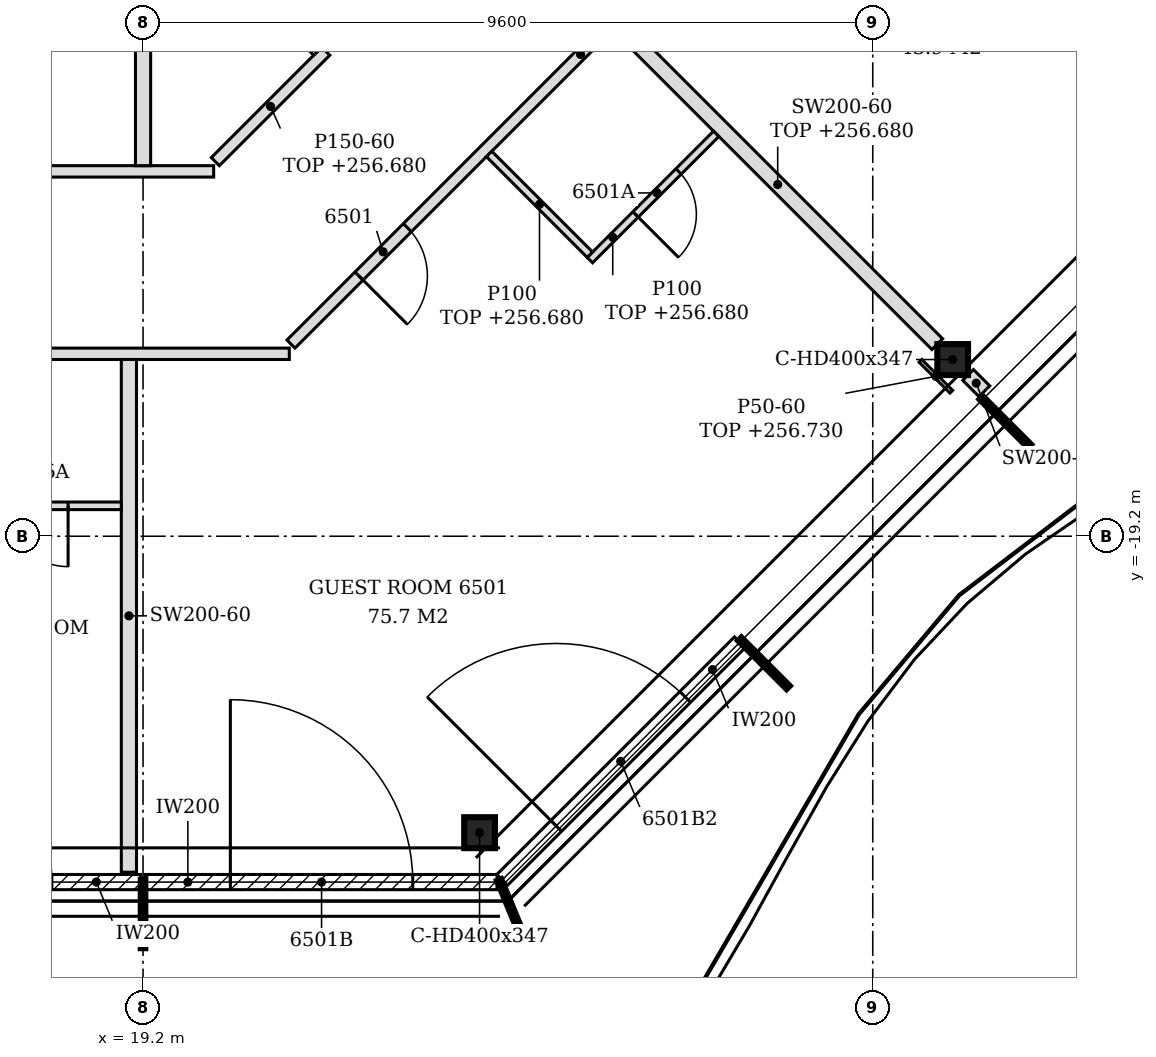
"""IFC4 building model, lengths in metres.
Left out: names, types, materials, properties, quantities, classifications, styles, units other than length and angle.
Written with IfcOpenShell. Run it as: python <this file> out.ifc"""

import sys

from ifc_helpers import new_model, si_unit, direction, frame, frame_2d, origin, origin_2d, place, context, subcontext, project, spatial, polyline, rectangle, i_section, outline, extrude, element, fill, save


model = new_model("IFC4")
c1 = context("Model", 3, precision=1e-05, world=origin(), true_north=direction((0.0, 1.0)))
c2 = subcontext(c1, "Body", "Model", "MODEL_VIEW")
j1 = project(units=[si_unit("LENGTHUNIT", "METRE"), si_unit("PLANEANGLEUNIT", "RADIAN")], contexts=[c1])
p1 = place(None, origin())
s1 = spatial("IfcSite", under=j1, at=p1, CompositionType="ELEMENT")
p2 = place(p1, origin())
s2 = spatial("IfcBuilding", under=s1, at=p2, CompositionType="ELEMENT")
p3 = place(p2, frame((0.0, 0.0, 253.8)))
s3 = spatial("IfcBuildingStorey", under=s2, at=p3, CompositionType="ELEMENT", Elevation=253.8)
for number, where, z_axis, x_axis in (
    (1, (23.627, -23.1, -0.15), (0.0, 0.0, 1.0), (1.0, 0.0, 0.0)),
    (2, (29.852, -16.876, -0.15), (0.0, 0.0, 1.0), (1.0, 0.0, 0.0)),
):
    element("IfcColumn", number, at=place(p3, frame(where, z_axis=z_axis, x_axis=x_axis)), inside=s3, PredefinedType="COLUMN", context=c2, shape_type="SweptSolid", body=[
        extrude(i_section(OverallWidth=0.404, OverallDepth=0.407, WebThickness=0.027, FlangeThickness=0.044, FilletRadius=0.015, at=origin_2d()), origin(), (0.0, 0.0, 1.0), 3.6),
    ])
p4 = place(p3, frame((14.43, -23.75, 0.0), z_axis=(0.0, 0.0, 1.0), x_axis=(1.0, 0.0, 0.0)))
e3 = element("IfcWall", 3, at=p4, inside=s3, PredefinedType="NOTDEFINED", context=c2, shape_type="SweptSolid", body=[
    extrude(rectangle(XDim=4.74, YDim=0.2, at=frame_2d((2.37, 0.0))), origin(), (0.0, 0.0, 1.0), 3.45),
])
p5 = place(p4, frame((1.17, 0.0, 0.0)))
e4 = element("IfcOpeningElement", 4, at=p5, cuts=e3, PredefinedType="OPENING", context=c2, shape_type="SweptSolid", body=[
    extrude(rectangle(XDim=2.4, YDim=2.4, at=frame_2d((1.2, 1.2))), frame((0.0, 0.11, 0.0), z_axis=(0.0, -1.0, 0.0), x_axis=(1.0, 0.0, 0.0)), (0.0, 0.0, 1.0), 0.22),
])
p6 = place(p3, frame((19.23, -23.75, 0.0), z_axis=(0.0, 0.0, 1.0), x_axis=(1.0, 0.0, 0.0)))
e5 = element("IfcWall", 5, at=p6, inside=s3, PredefinedType="NOTDEFINED", context=c2, shape_type="SweptSolid", body=[
    extrude(rectangle(XDim=4.626, YDim=0.2, at=frame_2d((2.313, 0.0))), origin(), (0.0, 0.0, 1.0), 3.45),
])
p7 = place(p6, frame((1.119, 0.0, 0.0)))
e6 = element("IfcOpeningElement", 6, at=p7, cuts=e5, PredefinedType="OPENING", context=c2, shape_type="SweptSolid", body=[
    extrude(rectangle(XDim=2.4, YDim=2.4, at=frame_2d((1.2, 1.2))), frame((0.0, 0.11, 0.0), z_axis=(0.0, -1.0, 0.0), x_axis=(1.0, 0.0, 0.0)), (0.0, 0.0, 1.0), 0.22),
])
p8 = place(p3, frame((23.925, -23.722, 0.0), z_axis=(0.0, 0.0, 1.0), x_axis=(0.707106781187, 0.707106781187, 0.0)))
e7 = element("IfcWall", 7, at=p8, inside=s3, PredefinedType="NOTDEFINED", context=c2, shape_type="SweptSolid", body=[
    extrude(rectangle(XDim=4.421, YDim=0.2, at=frame_2d((2.21, 0.0))), origin(), (0.0, 0.0, 1.0), 3.45),
])
p9 = place(p8, frame((1.005, 0.0, 0.0)))
e8 = element("IfcOpeningElement", 8, at=p9, cuts=e7, PredefinedType="OPENING", context=c2, shape_type="SweptSolid", body=[
    extrude(rectangle(XDim=2.4, YDim=2.4, at=frame_2d((1.2, 1.2))), frame((0.0, 0.11, 0.0), z_axis=(0.0, -1.0, 0.0), x_axis=(1.0, 0.0, 0.0)), (0.0, 0.0, 1.0), 0.22),
])
p10 = place(p3, frame((19.014, -23.62, 0.0), z_axis=(0.0, 0.0, 1.0), x_axis=(0.0, 1.0, 0.0)))
e9 = element("IfcWall", 9, at=p10, inside=s3, PredefinedType="PARTITIONING", context=c2, shape_type="SweptSolid", body=[
    extrude(outline(polyline([(0.0, 0.0), (6.745, 0.0), (6.745, 2.73), (0.64, 2.73), (0.638, 2.93), (0.37, 2.93), (0.368, 3.45), (0.0, 3.45), (0.0, 0.0)])), frame((0.0, 0.1, 0.0), z_axis=(0.0, -1.0, 0.0), x_axis=(1.0, 0.0, 0.0)), (0.0, 0.0, 1.0), 0.2),
])
p11 = place(p3, frame((16.564, -18.8, 0.0), z_axis=(0.0, 0.0, 1.0), x_axis=(1.0, 0.0, 0.0)))
e10 = element("IfcWall", 10, at=p11, inside=s3, PredefinedType="PARTITIONING", context=c2, shape_type="SweptSolid", body=[
    extrude(rectangle(XDim=2.35, YDim=0.1, at=frame_2d((1.175, 0.0))), origin(), (0.0, 0.0, 1.0), 3.45),
])
p12 = place(p11, frame((0.85, 0.0, 0.0)))
e11 = element("IfcOpeningElement", 11, at=p12, cuts=e10, PredefinedType="OPENING", context=c2, shape_type="SweptSolid", body=[
    extrude(rectangle(XDim=0.8, YDim=2.1, at=frame_2d((0.4, 1.05))), frame((0.0, 0.06, 0.0), z_axis=(0.0, -1.0, 0.0), x_axis=(1.0, 0.0, 0.0)), (0.0, 0.0, 1.0), 0.12),
])
p13 = place(p3, frame((30.269, -17.293, 0.0), z_axis=(0.0, 0.0, 1.0), x_axis=(-0.707509117806, 0.706704215511, 0.0)))
e12 = element("IfcWall", 12, at=p13, inside=s3, PredefinedType="PARTITIONING", context=c2, shape_type="SweptSolid", body=[
    extrude(rectangle(XDim=0.303, YDim=0.2, at=frame_2d((0.152, 0.0))), origin(), (0.0, 0.0, 1.0), 3.45),
])
p14 = place(p3, frame((-0.85, -16.8, 0.0), z_axis=(0.0, 0.0, 1.0), x_axis=(1.0, 0.0, 0.0)))
e13 = element("IfcWall", 13, at=p14, inside=s3, PredefinedType="PARTITIONING", context=c2, shape_type="SweptSolid", body=[
    extrude(outline(polyline([(0.0, 0.0), (21.974, 0.0), (21.974, 3.45), (20.199, 3.45), (20.198, 2.73), (19.899, 2.73), (19.897, 3.45), (8.199, 3.45), (8.198, 2.73), (7.899, 2.73), (7.897, 3.45), (0.0, 3.45), (0.0, 0.0)])), frame((0.0, 0.075, 0.0), z_axis=(0.0, -1.0, 0.0), x_axis=(1.0, 0.0, 0.0)), (0.0, 0.0, 1.0), 0.15),
])
p15 = place(p14, frame((2.893, 0.0, 0.0)))
e14 = element("IfcOpeningElement", 14, at=p15, cuts=e13, PredefinedType="OPENING", context=c2, shape_type="SweptSolid", body=[
    extrude(rectangle(XDim=0.9, YDim=2.1, at=frame_2d((0.45, 1.05))), frame((0.0, 0.085, 0.0), z_axis=(0.0, -1.0, 0.0), x_axis=(1.0, 0.0, 0.0)), (0.0, 0.0, 1.0), 0.17),
])
p16 = place(p14, frame((12.492, 0.0, 0.0)))
e15 = element("IfcOpeningElement", 15, at=p16, cuts=e13, PredefinedType="OPENING", context=c2, shape_type="SweptSolid", body=[
    extrude(rectangle(XDim=0.9, YDim=2.1, at=frame_2d((0.45, 1.05))), frame((0.0, 0.085, 0.0), z_axis=(0.0, -1.0, 0.0), x_axis=(1.0, 0.0, 0.0)), (0.0, 0.0, 1.0), 0.17),
])
p17 = place(p3, frame((21.146, -16.672, 0.0), z_axis=(0.0, 0.0, 1.0), x_axis=(0.707106781187, 0.707106781187, 0.0)))
e16 = element("IfcWall", 16, at=p17, inside=s3, PredefinedType="PARTITIONING", context=c2, shape_type="SweptSolid", body=[
    extrude(rectangle(XDim=17.719, YDim=0.15, at=frame_2d((8.859, 0.0))), origin(), (0.0, 0.0, 1.0), 2.88),
])
p18 = place(p17, frame((1.266, 0.0, 0.0)))
e17 = element("IfcOpeningElement", 17, at=p18, cuts=e16, PredefinedType="OPENING", context=c2, shape_type="SweptSolid", body=[
    extrude(rectangle(XDim=0.9, YDim=2.1, at=frame_2d((0.45, 1.05))), frame((0.0, 0.085, 0.0), z_axis=(0.0, -1.0, 0.0), x_axis=(1.0, 0.0, 0.0)), (0.0, 0.0, 1.0), 0.17),
])
p19 = place(p17, frame((8.611, 0.0, 0.0)))
e18 = element("IfcOpeningElement", 18, at=p19, cuts=e16, PredefinedType="OPENING", context=c2, shape_type="SweptSolid", body=[
    extrude(rectangle(XDim=0.9, YDim=2.1, at=frame_2d((0.45, 1.05))), frame((0.0, 0.085, 0.0), z_axis=(0.0, -1.0, 0.0), x_axis=(1.0, 0.0, 0.0)), (0.0, 0.0, 1.0), 0.17),
])
p20 = place(p17, frame((13.012, 0.0, 0.0)))
e19 = element("IfcOpeningElement", 19, at=p20, cuts=e16, PredefinedType="OPENING", context=c2, shape_type="SweptSolid", body=[
    extrude(rectangle(XDim=0.9, YDim=2.1, at=frame_2d((0.45, 1.05))), frame((0.0, 0.085, 0.0), z_axis=(0.0, -1.0, 0.0), x_axis=(1.0, 0.0, 0.0)), (0.0, 0.0, 1.0), 0.17),
])
p21 = place(p3, frame((29.649, -16.673, 0.0), z_axis=(0.0, 0.0, 1.0), x_axis=(-0.70712733811, 0.707086223665, 0.0)))
e20 = element("IfcWall", 20, at=p21, inside=s3, PredefinedType="PARTITIONING", context=c2, shape_type="SweptSolid", body=[
    extrude(rectangle(XDim=5.938, YDim=0.2, at=frame_2d((2.969, 0.0))), origin(), (0.0, 0.0, 1.0), 2.88),
])
p22 = place(p3, frame((25.079, -15.567, 0.0), z_axis=(0.0, 0.0, 1.0), x_axis=(0.707106781187, 0.707106781187, 0.0)))
e21 = element("IfcWall", 21, at=p22, inside=s3, PredefinedType="PARTITIONING", context=c2, shape_type="SweptSolid", body=[
    extrude(rectangle(XDim=2.35, YDim=0.1, at=frame_2d((1.175, 0.0))), origin(), (0.0, 0.0, 1.0), 2.88),
])
p23 = place(p22, frame((0.85, 0.0, 0.0)))
e22 = element("IfcOpeningElement", 22, at=p23, cuts=e21, PredefinedType="OPENING", context=c2, shape_type="SweptSolid", body=[
    extrude(rectangle(XDim=0.8, YDim=2.1, at=frame_2d((0.4, 1.05))), frame((0.0, 0.06, 0.0), z_axis=(0.0, -1.0, 0.0), x_axis=(1.0, 0.0, 0.0)), (0.0, 0.0, 1.0), 0.12),
])
p24 = place(p3, frame((25.079, -15.497, 0.0), z_axis=(0.0, 0.0, 1.0), x_axis=(-0.707106781187, 0.707106781187, 0.0)))
e23 = element("IfcWall", 23, at=p24, inside=s3, PredefinedType="PARTITIONING", context=c2, shape_type="SweptSolid", body=[
    extrude(rectangle(XDim=1.875, YDim=0.1, at=frame_2d((0.938, 0.0))), origin(), (0.0, 0.0, 1.0), 2.88),
])
p25 = place(p3, frame((7.125, -14.4, 0.0), z_axis=(0.0, 0.0, 1.0), x_axis=(1.0, 0.0, 0.0)))
e24 = element("IfcWall", 24, at=p25, inside=s3, PredefinedType="PARTITIONING", context=c2, shape_type="SweptSolid", body=[
    extrude(outline(polyline([(0.0, 0.0), (13.004, 0.0), (13.004, 2.88), (12.225, 2.88), (12.223, 2.73), (11.925, 2.73), (11.923, 2.88), (0.225, 2.88), (0.223, 2.73), (0.0, 2.73), (0.0, 0.0)])), frame((0.0, 0.075, 0.0), z_axis=(0.0, -1.0, 0.0), x_axis=(1.0, 0.0, 0.0)), (0.0, 0.0, 1.0), 0.15),
])
p26 = place(p3, frame((19.2, -14.325, 0.0), z_axis=(0.0, 0.0, 1.0), x_axis=(0.0, 1.0, 0.0)))
e25 = element("IfcWall", 25, at=p26, inside=s3, PredefinedType="PARTITIONING", context=c2, shape_type="SweptSolid", body=[
    extrude(rectangle(XDim=3.92, YDim=0.2, at=frame_2d((1.96, 0.0))), origin(), (0.0, 0.0, 1.0), 2.73),
])
p27 = place(p3, frame((20.151, -14.272, 0.0), z_axis=(0.0, 0.0, 1.0), x_axis=(0.707106781187, 0.707106781187, 0.0)))
e26 = element("IfcWall", 26, at=p27, inside=s3, PredefinedType="PARTITIONING", context=c2, shape_type="SweptSolid", body=[
    extrude(rectangle(XDim=2.055, YDim=0.15, at=frame_2d((1.027, 0.0))), origin(), (0.0, 0.0, 1.0), 2.88),
])
p28 = place(p3, frame((34.581, -12.981, 0.0), z_axis=(0.0, 0.0, 1.0), x_axis=(-0.707133900936, 0.707079660397, 0.0)))
e27 = element("IfcWall", 27, at=p28, inside=s3, PredefinedType="PARTITIONING", context=c2, shape_type="SweptSolid", body=[
    extrude(rectangle(XDim=4.501, YDim=0.2, at=frame_2d((2.25, 0.0))), origin(), (0.0, 0.0, 1.0), 2.63),
])
p29 = place(p3, frame((21.498, -12.819, 0.0), z_axis=(0.0, 0.0, 1.0), x_axis=(-0.707106781187, 0.707106781187, 0.0)))
e28 = element("IfcWall", 28, at=p29, inside=s3, PredefinedType="PARTITIONING", context=c2, shape_type="SweptSolid", body=[
    extrude(rectangle(XDim=3.033, YDim=0.15, at=frame_2d((1.517, 0.0))), origin(), (0.0, 0.0, 1.0), 2.73),
])
p30 = place(p29, frame((1.137, 0.0, 0.0)))
e29 = element("IfcOpeningElement", 29, at=p30, cuts=e28, PredefinedType="OPENING", context=c2, shape_type="SweptSolid", body=[
    extrude(rectangle(XDim=0.9, YDim=2.1, at=frame_2d((0.45, 1.05))), frame((0.0, 0.085, 0.0), z_axis=(0.0, -1.0, 0.0), x_axis=(1.0, 0.0, 0.0)), (0.0, 0.0, 1.0), 0.17),
])
p31 = place(p3, frame((29.834, -17.299, 0.0), z_axis=(0.0, 0.0, 1.0), x_axis=(-0.707106781187, 0.707106781187, 0.0)))
e30 = element("IfcWall", 30, at=p31, inside=s3, PredefinedType="PARTITIONING", context=c2, shape_type="SweptSolid", body=[
    extrude(rectangle(XDim=0.573, YDim=0.05, at=frame_2d((0.287, 0.0))), origin(), (0.0, 0.0, 1.0), 2.93),
])
p32 = place(p7, origin())
e31 = element("IfcDoor", 31, at=p32, inside=s3, OperationType="SINGLE_SWING_LEFT", PredefinedType="DOOR", context=c2, shape_type="SweptSolid", body=[
    extrude(rectangle(XDim=2.4, YDim=2.4, at=frame_2d((1.2, 1.2))), frame((0.0, 0.025, 0.0), z_axis=(0.0, -1.0, 0.0), x_axis=(1.0, 0.0, 0.0)), (0.0, 0.0, 1.0), 0.05),
])
fill(e6, e31)
p33 = place(p9, origin())
e32 = element("IfcDoor", 32, at=p33, inside=s3, OperationType="SINGLE_SWING_LEFT", PredefinedType="DOOR", context=c2, shape_type="SweptSolid", body=[
    extrude(rectangle(XDim=2.4, YDim=2.4, at=frame_2d((1.2, 1.2))), frame((0.0, 0.025, 0.0), z_axis=(0.0, -1.0, 0.0), x_axis=(1.0, 0.0, 0.0)), (0.0, 0.0, 1.0), 0.05),
])
fill(e8, e32)
p34 = place(p18, frame((0.9, 0.0, 0.0), z_axis=(0.0, 0.0, 1.0), x_axis=(-1.0, 0.0, 0.0)))
e33 = element("IfcDoor", 33, at=p34, inside=s3, OperationType="SINGLE_SWING_RIGHT", PredefinedType="DOOR", context=c2, shape_type="SweptSolid", body=[
    extrude(rectangle(XDim=0.9, YDim=2.1, at=frame_2d((0.45, 1.05))), frame((0.0, 0.025, 0.0), z_axis=(0.0, -1.0, 0.0), x_axis=(1.0, 0.0, 0.0)), (0.0, 0.0, 1.0), 0.05),
])
fill(e17, e33)
p35 = place(p23, frame((0.8, 0.0, 0.0), z_axis=(0.0, 0.0, 1.0), x_axis=(-1.0, 0.0, 0.0)))
e34 = element("IfcDoor", 34, at=p35, inside=s3, OperationType="SINGLE_SWING_RIGHT", PredefinedType="DOOR", context=c2, shape_type="SweptSolid", body=[
    extrude(rectangle(XDim=0.8, YDim=2.1, at=frame_2d((0.4, 1.05))), frame((0.0, 0.025, 0.0), z_axis=(0.0, -1.0, 0.0), x_axis=(1.0, 0.0, 0.0)), (0.0, 0.0, 1.0), 0.05),
])
fill(e22, e34)
p36 = place(p12, frame((0.8, 0.0, 0.0), z_axis=(0.0, 0.0, 1.0), x_axis=(-1.0, 0.0, 0.0)))
e35 = element("IfcDoor", 35, at=p36, inside=s3, OperationType="SINGLE_SWING_LEFT", PredefinedType="DOOR", context=c2, shape_type="SweptSolid", body=[
    extrude(rectangle(XDim=0.8, YDim=2.1, at=frame_2d((0.4, 1.05))), frame((0.0, 0.025, 0.0), z_axis=(0.0, -1.0, 0.0), x_axis=(1.0, 0.0, 0.0)), (0.0, 0.0, 1.0), 0.05),
])
fill(e11, e35)
save(model, sys.argv[1])
